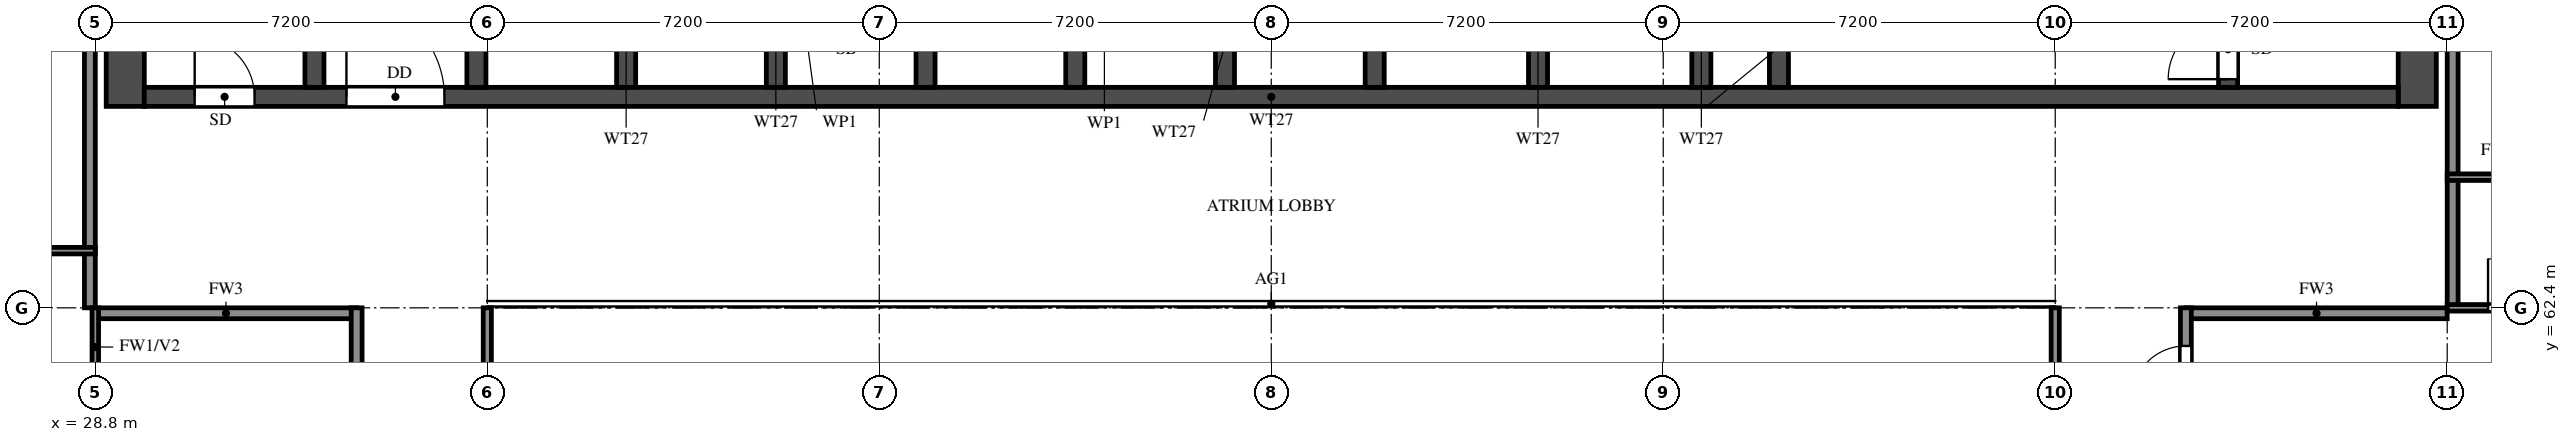
"""IFC4 building model, lengths in metres.
Left out: names, types, materials, properties, quantities, classifications, styles, units other than length and angle.
Written with IfcOpenShell. Run it as: python <this file> out.ifc"""

import sys

from ifc_helpers import new_model, si_unit, direction, frame, frame_2d, origin, place, context, subcontext, project, spatial, rectangle, extrude, element, fill, save


model = new_model("IFC4")
c1 = context("Model", 3, precision=1e-05, world=origin(), true_north=direction((0.0, 1.0)))
c2 = subcontext(c1, "Body", "Model", "MODEL_VIEW")
j1 = project(units=[si_unit("LENGTHUNIT", "METRE"), si_unit("PLANEANGLEUNIT", "RADIAN")], contexts=[c1])
p1 = place(None, origin())
s1 = spatial("IfcSite", under=j1, at=p1, CompositionType="ELEMENT")
p2 = place(p1, origin())
s2 = spatial("IfcBuilding", under=s1, at=p2, CompositionType="ELEMENT")
p3 = place(p2, frame((0.0, 0.0, 160.5)))
s3 = spatial("IfcBuildingStorey", under=s2, at=p3, CompositionType="ELEMENT", Elevation=160.5)
for number, where, z_axis, x_axis in (
    (1, (29.35, 66.1, 0.0), (0.0, 0.0, 1.0), (0.0, 1.0, 0.0)),
    (2, (71.45, 66.1, 0.0), (0.0, 0.0, 1.0), (0.0, 1.0, 0.0)),
):
    element("IfcWall", number, at=place(p3, frame(where, z_axis=z_axis, x_axis=x_axis)), inside=s3, PredefinedType="SHEAR", context=c2, shape_type="SweptSolid", body=[
        extrude(rectangle(XDim=11.9, YDim=0.7, at=frame_2d((5.95, 0.0))), origin(), (0.0, 0.0, 1.0), 3.2),
    ])
p4 = place(p3, frame((29.7, 66.275, 0.0), z_axis=(0.0, 0.0, 1.0), x_axis=(1.0, 0.0, 0.0)))
e3 = element("IfcWall", 3, at=p4, inside=s3, PredefinedType="SHEAR", context=c2, shape_type="SweptSolid", body=[
    extrude(rectangle(XDim=41.4, YDim=0.35, at=frame_2d((20.7, 0.0))), origin(), (0.0, 0.0, 1.0), 3.2),
])
p5 = place(p4, frame((0.925, 0.0, 0.0)))
e4 = element("IfcOpeningElement", 4, at=p5, cuts=e3, PredefinedType="OPENING", context=c2, shape_type="SweptSolid", body=[
    extrude(rectangle(XDim=1.1, YDim=2.1, at=frame_2d((0.55, 1.05))), frame((0.0, 0.185, 0.0), z_axis=(0.0, -1.0, 0.0), x_axis=(1.0, 0.0, 0.0)), (0.0, 0.0, 1.0), 0.37),
])
p6 = place(p4, frame((3.712, 0.0, 0.0)))
e5 = element("IfcOpeningElement", 5, at=p6, cuts=e3, PredefinedType="OPENING", context=c2, shape_type="SweptSolid", body=[
    extrude(rectangle(XDim=1.8, YDim=2.1, at=frame_2d((0.9, 1.05))), frame((0.0, 0.185, 0.0), z_axis=(0.0, -1.0, 0.0), x_axis=(1.0, 0.0, 0.0)), (0.0, 0.0, 1.0), 0.37),
])
p7 = place(p3, frame((32.825, 66.45, 0.0), z_axis=(0.0, 0.0, 1.0), x_axis=(0.0, 1.0, 0.0)))
e6 = element("IfcWall", 6, at=p7, inside=s3, PredefinedType="SHEAR", context=c2, shape_type="SweptSolid", body=[
    extrude(rectangle(XDim=10.85, YDim=0.35, at=frame_2d((5.425, 0.0))), origin(), (0.0, 0.0, 1.0), 3.2),
])
p8 = place(p3, frame((67.975, 66.45, 0.0), z_axis=(0.0, 0.0, 1.0), x_axis=(0.0, 1.0, 0.0)))
e7 = element("IfcWall", 7, at=p8, inside=s3, PredefinedType="SHEAR", context=c2, shape_type="SweptSolid", body=[
    extrude(rectangle(XDim=10.85, YDim=0.35, at=frame_2d((5.425, 0.0))), origin(), (0.0, 0.0, 1.0), 3.2),
])
p9 = place(p8, frame((0.15, 0.0, 0.0)))
e8 = element("IfcOpeningElement", 8, at=p9, cuts=e7, PredefinedType="OPENING", context=c2, shape_type="SweptSolid", body=[
    extrude(rectangle(XDim=1.1, YDim=2.1, at=frame_2d((0.55, 1.05))), frame((0.0, 0.185, 0.0), z_axis=(0.0, -1.0, 0.0), x_axis=(1.0, 0.0, 0.0)), (0.0, 0.0, 1.0), 0.37),
])
p10 = place(p3, frame((59.725, 66.45, 0.0), z_axis=(0.0, 0.0, 1.0), x_axis=(0.0, 1.0, 0.0)))
e9 = element("IfcWall", 9, at=p10, inside=s3, PredefinedType="SHEAR", context=c2, shape_type="SweptSolid", body=[
    extrude(rectangle(XDim=6.125, YDim=0.35, at=frame_2d((3.062, 0.0))), origin(), (0.0, 0.0, 1.0), 3.2),
])
p11 = place(p10, frame((3.85, 0.0, 0.0)))
e10 = element("IfcOpeningElement", 10, at=p11, cuts=e9, PredefinedType="OPENING", context=c2, shape_type="SweptSolid", body=[
    extrude(rectangle(XDim=1.2, YDim=2.1, at=frame_2d((0.6, 1.05))), frame((0.0, 0.185, 0.0), z_axis=(0.0, -1.0, 0.0), x_axis=(1.0, 0.0, 0.0)), (0.0, 0.0, 1.0), 0.37),
])
for number, where, z_axis, x_axis in (
    (11, (35.8, 66.45, 0.0), (0.0, 0.0, 1.0), (0.0, 1.0, 0.0)),
    (12, (38.55, 66.45, 0.0), (0.0, 0.0, 1.0), (0.0, 1.0, 0.0)),
    (13, (41.3, 66.45, 0.0), (0.0, 0.0, 1.0), (0.0, 1.0, 0.0)),
    (14, (44.05, 66.45, 0.0), (0.0, 0.0, 1.0), (0.0, 1.0, 0.0)),
    (15, (46.8, 66.45, 0.0), (0.0, 0.0, 1.0), (0.0, 1.0, 0.0)),
    (16, (49.55, 66.45, 0.0), (0.0, 0.0, 1.0), (0.0, 1.0, 0.0)),
    (17, (52.3, 66.45, 0.0), (0.0, 0.0, 1.0), (0.0, 1.0, 0.0)),
    (18, (55.3, 66.45, 0.0), (0.0, 0.0, 1.0), (0.0, 1.0, 0.0)),
    (19, (58.3, 66.45, 0.0), (0.0, 0.0, 1.0), (0.0, 1.0, 0.0)),
):
    element("IfcWall", number, at=place(p3, frame(where, z_axis=z_axis, x_axis=x_axis)), inside=s3, PredefinedType="SHEAR", context=c2, shape_type="SweptSolid", body=[
        extrude(rectangle(XDim=2.425, YDim=0.35, at=frame_2d((1.212, 0.0))), origin(), (0.0, 0.0, 1.0), 3.2),
    ])
for number, where, z_axis, x_axis in (
    (20, (28.8, 62.3, 0.0), (0.0, 0.0, 1.0), (1.0, 0.0, 0.0)),
    (21, (67.2, 62.3, 0.0), (0.0, 0.0, 1.0), (1.0, 0.0, 0.0)),
):
    element("IfcWall", number, at=place(p3, frame(where, z_axis=z_axis, x_axis=x_axis)), inside=s3, PredefinedType="SOLIDWALL", context=c2, shape_type="SweptSolid", body=[
        extrude(rectangle(XDim=4.8, YDim=0.2, at=frame_2d((2.4, 0.0))), origin(), (0.0, 0.0, 1.0), 3.2),
    ])
p12 = place(p3, frame((28.7, 62.4, 0.0), z_axis=(0.0, 0.0, 1.0), x_axis=(0.0, 1.0, 0.0)))
e22 = element("IfcWall", 22, at=p12, inside=s3, PredefinedType="SOLIDWALL", context=c2, shape_type="SweptSolid", body=[
    extrude(rectangle(XDim=15.6, YDim=0.2, at=frame_2d((7.8, 0.0))), origin(), (0.0, 0.0, 1.0), 3.2),
])
p13 = place(p3, frame((33.6, 50.4, 0.0), z_axis=(0.0, 0.0, 1.0), x_axis=(0.0, 1.0, 0.0)))
e23 = element("IfcWall", 23, at=p13, inside=s3, PredefinedType="SOLIDWALL", context=c2, shape_type="SweptSolid", body=[
    extrude(rectangle(XDim=12.0, YDim=0.2, at=frame_2d((6.0, 0.0))), origin(), (0.0, 0.0, 1.0), 3.2),
])
p14 = place(p13, frame((0.7, 0.0, 0.0)))
e24 = element("IfcOpeningElement", 24, at=p14, cuts=e23, PredefinedType="OPENING", context=c2, shape_type="SweptSolid", body=[
    extrude(rectangle(XDim=1.0, YDim=2.1, at=frame_2d((0.5, 1.05))), frame((0.0, 0.11, 0.0), z_axis=(0.0, -1.0, 0.0), x_axis=(1.0, 0.0, 0.0)), (0.0, 0.0, 1.0), 0.22),
])
p15 = place(p13, frame((9.7, 0.0, 0.0)))
e25 = element("IfcOpeningElement", 25, at=p15, cuts=e23, PredefinedType="OPENING", context=c2, shape_type="SweptSolid", body=[
    extrude(rectangle(XDim=1.0, YDim=2.1, at=frame_2d((0.5, 1.05))), frame((0.0, 0.11, 0.0), z_axis=(0.0, -1.0, 0.0), x_axis=(1.0, 0.0, 0.0)), (0.0, 0.0, 1.0), 0.22),
])
p16 = place(p3, frame((67.2, 60.0, 0.0), z_axis=(0.0, 0.0, 1.0), x_axis=(0.0, 1.0, 0.0)))
e26 = element("IfcWall", 26, at=p16, inside=s3, PredefinedType="SOLIDWALL", context=c2, shape_type="SweptSolid", body=[
    extrude(rectangle(XDim=2.4, YDim=0.2, at=frame_2d((1.2, 0.0))), origin(), (0.0, 0.0, 1.0), 3.2),
])
p17 = place(p16, frame((0.7, 0.0, 0.0)))
e27 = element("IfcOpeningElement", 27, at=p17, cuts=e26, PredefinedType="OPENING", context=c2, shape_type="SweptSolid", body=[
    extrude(rectangle(XDim=1.0, YDim=2.1, at=frame_2d((0.5, 1.05))), frame((0.0, 0.11, 0.0), z_axis=(0.0, -1.0, 0.0), x_axis=(1.0, 0.0, 0.0)), (0.0, 0.0, 1.0), 0.22),
])
p18 = place(p3, frame((72.1, 62.4, 0.0), z_axis=(0.0, 0.0, 1.0), x_axis=(0.0, 1.0, 0.0)))
e28 = element("IfcWall", 28, at=p18, inside=s3, PredefinedType="SOLIDWALL", context=c2, shape_type="SweptSolid", body=[
    extrude(rectangle(XDim=15.6, YDim=0.2, at=frame_2d((7.8, 0.0))), origin(), (0.0, 0.0, 1.0), 3.2),
])
p19 = place(p3, frame((72.0, 62.4, 0.0), z_axis=(0.0, 0.0, 1.0), x_axis=(1.0, 0.0, 0.0)))
e29 = element("IfcWall", 29, at=p19, inside=s3, PredefinedType="PARTITIONING", context=c2, shape_type="SweptSolid", body=[
    extrude(rectangle(XDim=2.4, YDim=0.12, at=frame_2d((1.2, 0.0))), origin(), (0.0, 0.0, 1.0), 3.2),
])
p20 = place(p19, frame((0.75, 0.0, 0.0)))
e30 = element("IfcOpeningElement", 30, at=p20, cuts=e29, PredefinedType="OPENING", context=c2, shape_type="SweptSolid", body=[
    extrude(rectangle(XDim=0.9, YDim=2.1, at=frame_2d((0.45, 1.05))), frame((0.0, 0.07, 0.0), z_axis=(0.0, -1.0, 0.0), x_axis=(1.0, 0.0, 0.0)), (0.0, 0.0, 1.0), 0.14),
])
p21 = place(p3, frame((23.7, 63.45, 0.0), z_axis=(0.0, 0.0, 1.0), x_axis=(1.0, 0.0, 0.0)))
e31 = element("IfcWall", 31, at=p21, inside=s3, PredefinedType="PARTITIONING", context=c2, shape_type="SweptSolid", body=[
    extrude(rectangle(XDim=5.1, YDim=0.12, at=frame_2d((2.55, 0.0))), origin(), (0.0, 0.0, 1.0), 3.2),
])
p22 = place(p3, frame((72.0, 64.8, 0.0), z_axis=(0.0, 0.0, 1.0), x_axis=(1.0, 0.0, 0.0)))
e32 = element("IfcWall", 32, at=p22, inside=s3, PredefinedType="PARTITIONING", context=c2, shape_type="SweptSolid", body=[
    extrude(rectangle(XDim=5.1, YDim=0.12, at=frame_2d((2.55, 0.0))), origin(), (0.0, 0.0, 1.0), 3.2),
])
p23 = place(p22, frame((2.1, 0.0, 0.0)))
e33 = element("IfcOpeningElement", 33, at=p23, cuts=e32, PredefinedType="OPENING", context=c2, shape_type="SweptSolid", body=[
    extrude(rectangle(XDim=0.9, YDim=2.1, at=frame_2d((0.45, 1.05))), frame((0.0, 0.07, 0.0), z_axis=(0.0, -1.0, 0.0), x_axis=(1.0, 0.0, 0.0)), (0.0, 0.0, 1.0), 0.14),
])
p24 = place(p3, frame((28.8, 58.8, 0.0), z_axis=(0.0, 0.0, 1.0), x_axis=(0.0, 1.0, 0.0)))
e34 = element("IfcWall", 34, at=p24, inside=s3, PredefinedType="PARTITIONING", context=c2, shape_type="SweptSolid", body=[
    extrude(rectangle(XDim=3.6, YDim=0.12, at=frame_2d((1.8, 0.0))), origin(), (0.0, 0.0, 1.0), 3.2),
])
p25 = place(p24, frame((0.75, 0.0, 0.0)))
e35 = element("IfcOpeningElement", 35, at=p25, cuts=e34, PredefinedType="OPENING", context=c2, shape_type="SweptSolid", body=[
    extrude(rectangle(XDim=0.9, YDim=2.1, at=frame_2d((0.45, 1.05))), frame((0.0, 0.07, 0.0), z_axis=(0.0, -1.0, 0.0), x_axis=(1.0, 0.0, 0.0)), (0.0, 0.0, 1.0), 0.14),
])
for number, where, z_axis, x_axis in (
    (36, (36.0, 48.0, 0.0), (0.0, 0.0, 1.0), (0.0, 1.0, 0.0)),
    (37, (64.8, 48.0, 0.0), (0.0, 0.0, 1.0), (0.0, 1.0, 0.0)),
):
    element("IfcWall", number, at=place(p3, frame(where, z_axis=z_axis, x_axis=x_axis)), inside=s3, PredefinedType="SOLIDWALL", context=c2, shape_type="SweptSolid", body=[
        extrude(rectangle(XDim=14.4, YDim=0.15, at=frame_2d((7.2, 0.0))), origin(), (0.0, 0.0, 1.0), 2.3),
    ])
p26 = place(p5, origin())
e38 = element("IfcDoor", 38, at=p26, inside=s3, OperationType="SINGLE_SWING_LEFT", PredefinedType="DOOR", context=c2, shape_type="SweptSolid", body=[
    extrude(rectangle(XDim=1.1, YDim=2.1, at=frame_2d((0.55, 1.05))), frame((0.0, 0.025, 0.0), z_axis=(0.0, -1.0, 0.0), x_axis=(1.0, 0.0, 0.0)), (0.0, 0.0, 1.0), 0.05),
])
fill(e4, e38)
p27 = place(p9, origin())
e39 = element("IfcDoor", 39, at=p27, inside=s3, OperationType="SINGLE_SWING_LEFT", PredefinedType="DOOR", context=c2, shape_type="SweptSolid", body=[
    extrude(rectangle(XDim=1.1, YDim=2.1, at=frame_2d((0.55, 1.05))), frame((0.0, 0.025, 0.0), z_axis=(0.0, -1.0, 0.0), x_axis=(1.0, 0.0, 0.0)), (0.0, 0.0, 1.0), 0.05),
])
fill(e8, e39)
p28 = place(p6, origin())
e40 = element("IfcDoor", 40, at=p28, inside=s3, OperationType="DOUBLE_DOOR_SINGLE_SWING", PredefinedType="DOOR", context=c2, shape_type="SweptSolid", body=[
    extrude(rectangle(XDim=1.8, YDim=2.1, at=frame_2d((0.9, 1.05))), frame((0.0, 0.025, 0.0), z_axis=(0.0, -1.0, 0.0), x_axis=(1.0, 0.0, 0.0)), (0.0, 0.0, 1.0), 0.05),
])
fill(e5, e40)
p29 = place(p20, origin())
e41 = element("IfcDoor", 41, at=p29, inside=s3, OperationType="SINGLE_SWING_RIGHT", PredefinedType="DOOR", context=c2, shape_type="SweptSolid", body=[
    extrude(rectangle(XDim=0.9, YDim=2.1, at=frame_2d((0.45, 1.05))), frame((0.0, 0.025, 0.0), z_axis=(0.0, -1.0, 0.0), x_axis=(1.0, 0.0, 0.0)), (0.0, 0.0, 1.0), 0.05),
])
fill(e30, e41)
p30 = place(p17, origin())
e42 = element("IfcDoor", 42, at=p30, inside=s3, OperationType="SINGLE_SWING_LEFT", PredefinedType="DOOR", context=c2, shape_type="SweptSolid", body=[
    extrude(rectangle(XDim=1.0, YDim=2.1, at=frame_2d((0.5, 1.05))), frame((0.0, 0.025, 0.0), z_axis=(0.0, -1.0, 0.0), x_axis=(1.0, 0.0, 0.0)), (0.0, 0.0, 1.0), 0.05),
])
fill(e27, e42)
save(model, sys.argv[1])
